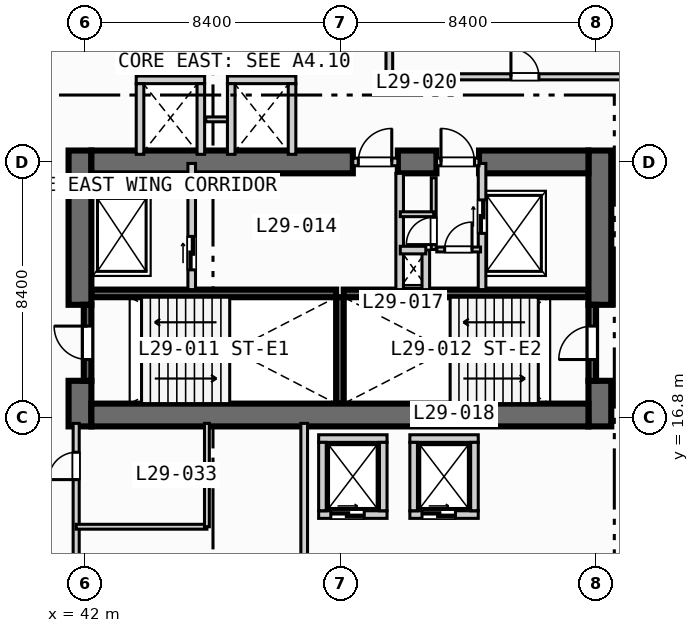
"""IFC4 building model, lengths in metres.
Left out: names, types, materials, properties, quantities, classifications, styles, units other than length and angle.
Written with IfcOpenShell. Run it as: python <this file> out.ifc"""

import sys

from ifc_helpers import new_model, si_unit, direction, frame, frame_2d, origin, place, context, subcontext, project, spatial, rectangle, extrude, element, fill, save


model = new_model("IFC4")
c1 = context("Model", 3, precision=1e-05, world=origin(), true_north=direction((0.0, 1.0)))
c2 = subcontext(c1, "Body", "Model", "MODEL_VIEW")
j1 = project(units=[si_unit("LENGTHUNIT", "METRE"), si_unit("PLANEANGLEUNIT", "RADIAN")], contexts=[c1])
p1 = place(None, origin())
s1 = spatial("IfcSite", under=j1, at=p1, CompositionType="ELEMENT")
p2 = place(p1, origin())
s2 = spatial("IfcBuilding", under=s1, at=p2, CompositionType="ELEMENT")
p3 = place(p2, frame((0.0, 0.0, 122.8)))
s3 = spatial("IfcBuildingStorey", under=s2, at=p3, CompositionType="ELEMENT", Elevation=122.8)
for number, where, z_axis, x_axis in (
    (1, (42.2, 20.875, 0.0), (0.0, 0.0, 1.0), (1.0, 0.0, 0.0)),
    (2, (50.5, 20.875, 0.0), (0.0, 0.0, 1.0), (1.0, 0.0, 0.0)),
):
    element("IfcWall", number, at=place(p3, frame(where, z_axis=z_axis, x_axis=x_axis)), inside=s3, PredefinedType="SOLIDWALL", context=c2, shape_type="SweptSolid", body=[
        extrude(rectangle(XDim=8.05, YDim=0.25, at=frame_2d((4.025, 0.0))), origin(), (0.0, 0.0, 1.0), 3.55),
    ])
p4 = place(p3, frame((50.375, 17.25, 0.0), z_axis=(0.0, 0.0, 1.0), x_axis=(0.0, 1.0, 0.0)))
e3 = element("IfcWall", 3, at=p4, inside=s3, PredefinedType="SOLIDWALL", context=c2, shape_type="SweptSolid", body=[
    extrude(rectangle(XDim=3.5, YDim=0.25, at=frame_2d((1.75, 0.0))), origin(), (0.0, 0.0, 1.0), 3.55),
])
p5 = place(p3, frame((41.825, 16.5, 0.0), z_axis=(0.0, 0.0, 1.0), x_axis=(0.0, 1.0, 0.0)))
e4 = element("IfcWall", 4, at=p5, inside=s3, PredefinedType="SHEAR", context=c2, shape_type="SweptSolid", body=[
    extrude(rectangle(XDim=1.5, YDim=0.75, at=frame_2d((0.75, 0.0))), origin(), (0.0, 0.0, 1.0), 3.55),
])
p6 = place(p3, frame((41.825, 20.5, 0.0), z_axis=(0.0, 0.0, 1.0), x_axis=(0.0, 1.0, 0.0)))
e5 = element("IfcWall", 5, at=p6, inside=s3, PredefinedType="SHEAR", context=c2, shape_type="SweptSolid", body=[
    extrude(rectangle(XDim=5.075, YDim=0.75, at=frame_2d((2.538, 0.0))), origin(), (0.0, 0.0, 1.0), 3.55),
])
p7 = place(p3, frame((58.925, 16.5, 0.0), z_axis=(0.0, 0.0, 1.0), x_axis=(0.0, 1.0, 0.0)))
e6 = element("IfcWall", 6, at=p7, inside=s3, PredefinedType="SHEAR", context=c2, shape_type="SweptSolid", body=[
    extrude(rectangle(XDim=1.5, YDim=0.75, at=frame_2d((0.75, 0.0))), origin(), (0.0, 0.0, 1.0), 3.55),
])
p8 = place(p3, frame((58.925, 20.5, 0.0), z_axis=(0.0, 0.0, 1.0), x_axis=(0.0, 1.0, 0.0)))
e7 = element("IfcWall", 7, at=p8, inside=s3, PredefinedType="SHEAR", context=c2, shape_type="SweptSolid", body=[
    extrude(rectangle(XDim=5.075, YDim=0.75, at=frame_2d((2.538, 0.0))), origin(), (0.0, 0.0, 1.0), 3.55),
])
p9 = place(p3, frame((42.2, 16.875, 0.0), z_axis=(0.0, 0.0, 1.0), x_axis=(1.0, 0.0, 0.0)))
e8 = element("IfcWall", 8, at=p9, inside=s3, PredefinedType="SHEAR", context=c2, shape_type="SweptSolid", body=[
    extrude(rectangle(XDim=16.35, YDim=0.75, at=frame_2d((8.175, 0.0))), origin(), (0.0, 0.0, 1.0), 3.55),
])
p10 = place(p3, frame((42.2, 25.2, 0.0), z_axis=(0.0, 0.0, 1.0), x_axis=(1.0, 0.0, 0.0)))
e9 = element("IfcWall", 9, at=p10, inside=s3, PredefinedType="SHEAR", context=c2, shape_type="SweptSolid", body=[
    extrude(rectangle(XDim=8.6, YDim=0.75, at=frame_2d((4.3, 0.0))), origin(), (0.0, 0.0, 1.0), 3.55),
])
p11 = place(p3, frame((52.28, 25.2, 0.0), z_axis=(0.0, 0.0, 1.0), x_axis=(1.0, 0.0, 0.0)))
e10 = element("IfcWall", 10, at=p11, inside=s3, PredefinedType="SHEAR", context=c2, shape_type="SweptSolid", body=[
    extrude(rectangle(XDim=1.27, YDim=0.75, at=frame_2d((0.635, 0.0))), origin(), (0.0, 0.0, 1.0), 3.55),
])
p12 = place(p3, frame((54.95, 25.2, 0.0), z_axis=(0.0, 0.0, 1.0), x_axis=(1.0, 0.0, 0.0)))
e11 = element("IfcWall", 11, at=p12, inside=s3, PredefinedType="SHEAR", context=c2, shape_type="SweptSolid", body=[
    extrude(rectangle(XDim=3.6, YDim=0.75, at=frame_2d((1.8, 0.0))), origin(), (0.0, 0.0, 1.0), 3.55),
])
p13 = place(p3, frame((42.075, 18.0, 0.0), z_axis=(0.0, 0.0, 1.0), x_axis=(0.0, 1.0, 0.0)))
e12 = element("IfcWall", 12, at=p13, inside=s3, PredefinedType="SOLIDWALL", context=c2, shape_type="SweptSolid", body=[
    extrude(rectangle(XDim=2.5, YDim=0.25, at=frame_2d((1.25, 0.0))), origin(), (0.0, 0.0, 1.0), 3.55),
])
p14 = place(p13, frame((0.7, 0.0, 0.0)))
e13 = element("IfcOpeningElement", 13, at=p14, cuts=e12, PredefinedType="OPENING", context=c2, shape_type="SweptSolid", body=[
    extrude(rectangle(XDim=1.1, YDim=2.15, at=frame_2d((0.55, 1.075))), frame((0.0, 0.135, 0.0), z_axis=(0.0, -1.0, 0.0), x_axis=(1.0, 0.0, 0.0)), (0.0, 0.0, 1.0), 0.27),
])
p15 = place(p3, frame((58.675, 18.0, 0.0), z_axis=(0.0, 0.0, 1.0), x_axis=(0.0, 1.0, 0.0)))
e14 = element("IfcWall", 14, at=p15, inside=s3, PredefinedType="SOLIDWALL", context=c2, shape_type="SweptSolid", body=[
    extrude(rectangle(XDim=2.5, YDim=0.25, at=frame_2d((1.25, 0.0))), origin(), (0.0, 0.0, 1.0), 3.55),
])
p16 = place(p15, frame((0.7, 0.0, 0.0)))
e15 = element("IfcOpeningElement", 15, at=p16, cuts=e14, PredefinedType="OPENING", context=c2, shape_type="SweptSolid", body=[
    extrude(rectangle(XDim=1.1, YDim=2.15, at=frame_2d((0.55, 1.075))), frame((0.0, 0.135, 0.0), z_axis=(0.0, -1.0, 0.0), x_axis=(1.0, 0.0, 0.0)), (0.0, 0.0, 1.0), 0.27),
])
p17 = place(p3, frame((45.5, 21.0, 0.0), z_axis=(0.0, 0.0, 1.0), x_axis=(0.0, 1.0, 0.0)))
e16 = element("IfcWall", 16, at=p17, inside=s3, PredefinedType="SOLIDWALL", context=c2, shape_type="SweptSolid", body=[
    extrude(rectangle(XDim=4.15, YDim=0.25, at=frame_2d((2.075, 0.0))), origin(), (0.0, 0.0, 1.0), 3.55),
])
p18 = place(p17, frame((0.65, 0.0, 0.0)))
e17 = element("IfcOpeningElement", 17, at=p18, cuts=e16, PredefinedType="OPENING", context=c2, shape_type="SweptSolid", body=[
    extrude(rectangle(XDim=1.1, YDim=2.15, at=frame_2d((0.55, 1.075))), frame((0.0, 0.135, 0.0), z_axis=(0.0, -1.0, 0.0), x_axis=(1.0, 0.0, 0.0)), (0.0, 0.0, 1.0), 0.27),
])
p19 = place(p3, frame((50.8, 25.2, 0.0), z_axis=(0.0, 0.0, 1.0), x_axis=(1.0, 0.0, 0.0)))
e18 = element("IfcWall", 18, at=p19, inside=s3, PredefinedType="SOLIDWALL", context=c2, shape_type="SweptSolid", body=[
    extrude(rectangle(XDim=1.48, YDim=0.25, at=frame_2d((0.74, 0.0))), origin(), (0.0, 0.0, 1.0), 3.55),
])
p20 = place(p19, frame((0.18, 0.0, 0.0)))
e19 = element("IfcOpeningElement", 19, at=p20, cuts=e18, PredefinedType="OPENING", context=c2, shape_type="SweptSolid", body=[
    extrude(rectangle(XDim=1.1, YDim=2.15, at=frame_2d((0.55, 1.075))), frame((0.0, 0.135, 0.0), z_axis=(0.0, -1.0, 0.0), x_axis=(1.0, 0.0, 0.0)), (0.0, 0.0, 1.0), 0.27),
])
p21 = place(p3, frame((52.34, 21.0, 0.0), z_axis=(0.0, 0.0, 1.0), x_axis=(0.0, 1.0, 0.0)))
e20 = element("IfcWall", 20, at=p21, inside=s3, PredefinedType="SOLIDWALL", context=c2, shape_type="SweptSolid", body=[
    extrude(rectangle(XDim=3.825, YDim=0.25, at=frame_2d((1.913, 0.0))), origin(), (0.0, 0.0, 1.0), 3.55),
])
p22 = place(p3, frame((55.05, 21.0, 0.0), z_axis=(0.0, 0.0, 1.0), x_axis=(0.0, 1.0, 0.0)))
e21 = element("IfcWall", 21, at=p22, inside=s3, PredefinedType="SOLIDWALL", context=c2, shape_type="SweptSolid", body=[
    extrude(rectangle(XDim=4.15, YDim=0.25, at=frame_2d((2.075, 0.0))), origin(), (0.0, 0.0, 1.0), 3.55),
])
p23 = place(p22, frame((1.85, 0.0, 0.0)))
e22 = element("IfcOpeningElement", 22, at=p23, cuts=e21, PredefinedType="OPENING", context=c2, shape_type="SweptSolid", body=[
    extrude(rectangle(XDim=1.1, YDim=2.15, at=frame_2d((0.55, 1.075))), frame((0.0, 0.135, 0.0), z_axis=(0.0, -1.0, 0.0), x_axis=(1.0, 0.0, 0.0)), (0.0, 0.0, 1.0), 0.27),
])
p24 = place(p3, frame((53.55, 25.2, 0.0), z_axis=(0.0, 0.0, 1.0), x_axis=(1.0, 0.0, 0.0)))
e23 = element("IfcWall", 23, at=p24, inside=s3, PredefinedType="SOLIDWALL", context=c2, shape_type="SweptSolid", body=[
    extrude(rectangle(XDim=1.4, YDim=0.25, at=frame_2d((0.7, 0.0))), origin(), (0.0, 0.0, 1.0), 3.55),
])
p25 = place(p24, frame((0.15, 0.0, 0.0)))
e24 = element("IfcOpeningElement", 24, at=p25, cuts=e23, PredefinedType="OPENING", context=c2, shape_type="SweptSolid", body=[
    extrude(rectangle(XDim=1.1, YDim=2.15, at=frame_2d((0.55, 1.075))), frame((0.0, 0.135, 0.0), z_axis=(0.0, -1.0, 0.0), x_axis=(1.0, 0.0, 0.0)), (0.0, 0.0, 1.0), 0.27),
])
p26 = place(p3, frame((53.2, 21.0, 0.0), z_axis=(0.0, 0.0, 1.0), x_axis=(0.0, 1.0, 0.0)))
e25 = element("IfcWall", 25, at=p26, inside=s3, PredefinedType="SOLIDWALL", context=c2, shape_type="SweptSolid", body=[
    extrude(rectangle(XDim=1.3, YDim=0.25, at=frame_2d((0.65, 0.0))), origin(), (0.0, 0.0, 1.0), 3.55),
])
p27 = place(p3, frame((52.36, 22.3, 0.0), z_axis=(0.0, 0.0, 1.0), x_axis=(1.0, 0.0, 0.0)))
e26 = element("IfcWall", 26, at=p27, inside=s3, PredefinedType="SOLIDWALL", context=c2, shape_type="SweptSolid", body=[
    extrude(rectangle(XDim=0.84, YDim=0.25, at=frame_2d((0.42, 0.0))), origin(), (0.0, 0.0, 1.0), 3.55),
])
p28 = place(p3, frame((53.56, 22.32, 0.0), z_axis=(0.0, 0.0, 1.0), x_axis=(1.0, 0.0, 0.0)))
e27 = element("IfcWall", 27, at=p28, inside=s3, PredefinedType="PARTITIONING", context=c2, shape_type="SweptSolid", body=[
    extrude(rectangle(XDim=1.44, YDim=0.16, at=frame_2d((0.72, 0.0))), origin(), (0.0, 0.0, 1.0), 3.55),
])
p29 = place(p28, frame((0.26, 0.0, 0.0)))
e28 = element("IfcOpeningElement", 28, at=p29, cuts=e27, PredefinedType="OPENING", context=c2, shape_type="SweptSolid", body=[
    extrude(rectangle(XDim=0.9, YDim=2.1, at=frame_2d((0.45, 1.05))), frame((0.0, 0.09, 0.0), z_axis=(0.0, -1.0, 0.0), x_axis=(1.0, 0.0, 0.0)), (0.0, 0.0, 1.0), 0.18),
])
p30 = place(p3, frame((53.46, 22.32, 0.0), z_axis=(0.0, 0.0, 1.0), x_axis=(0.0, 1.0, 0.0)))
e29 = element("IfcWall", 29, at=p30, inside=s3, PredefinedType="PARTITIONING", context=c2, shape_type="SweptSolid", body=[
    extrude(rectangle(XDim=2.36, YDim=0.16, at=frame_2d((1.18, 0.0))), origin(), (0.0, 0.0, 1.0), 3.55),
])
p31 = place(p30, frame((0.16, 0.0, 0.0)))
e30 = element("IfcOpeningElement", 30, at=p31, cuts=e29, PredefinedType="OPENING", context=c2, shape_type="SweptSolid", body=[
    extrude(rectangle(XDim=0.9, YDim=2.1, at=frame_2d((0.45, 1.05))), frame((0.0, 0.09, 0.0), z_axis=(0.0, -1.0, 0.0), x_axis=(1.0, 0.0, 0.0)), (0.0, 0.0, 1.0), 0.18),
])
p32 = place(p3, frame((52.36, 23.48, 0.0), z_axis=(0.0, 0.0, 1.0), x_axis=(1.0, 0.0, 0.0)))
e31 = element("IfcWall", 31, at=p32, inside=s3, PredefinedType="PARTITIONING", context=c2, shape_type="SweptSolid", body=[
    extrude(rectangle(XDim=1.1, YDim=0.16, at=frame_2d((0.55, 0.0))), origin(), (0.0, 0.0, 1.0), 3.55),
])
p33 = place(p3, frame((49.675, 13.6, 0.0), z_axis=(0.0, 0.0, 1.0), x_axis=(1.0, 0.0, 0.0)))
e32 = element("IfcWall", 32, at=p33, inside=s3, PredefinedType="SOLIDWALL", context=c2, shape_type="SweptSolid", body=[
    extrude(rectangle(XDim=2.25, YDim=0.25, at=frame_2d((1.125, 0.0))), origin(), (0.0, 0.0, 1.0), 3.55),
])
p34 = place(p33, frame((0.4, 0.0, 0.0)))
e33 = element("IfcOpeningElement", 33, at=p34, cuts=e32, PredefinedType="OPENING", context=c2, shape_type="SweptSolid", body=[
    extrude(rectangle(XDim=1.1, YDim=2.15, at=frame_2d((0.55, 1.075))), frame((0.0, 0.135, 0.0), z_axis=(0.0, -1.0, 0.0), x_axis=(1.0, 0.0, 0.0)), (0.0, 0.0, 1.0), 0.27),
])
for number, where, z_axis, x_axis in (
    (34, (49.675, 16.1, 0.0), (0.0, 0.0, 1.0), (1.0, 0.0, 0.0)),
    (35, (49.8, 13.725, 0.0), (0.0, 0.0, 1.0), (0.0, 1.0, 0.0)),
    (36, (51.8, 13.725, 0.0), (0.0, 0.0, 1.0), (0.0, 1.0, 0.0)),
):
    element("IfcWall", number, at=place(p3, frame(where, z_axis=z_axis, x_axis=x_axis)), inside=s3, PredefinedType="SOLIDWALL", context=c2, shape_type="SweptSolid", body=[
        extrude(rectangle(XDim=2.25, YDim=0.25, at=frame_2d((1.125, 0.0))), origin(), (0.0, 0.0, 1.0), 3.55),
    ])
p35 = place(p3, frame((52.675, 13.6, 0.0), z_axis=(0.0, 0.0, 1.0), x_axis=(1.0, 0.0, 0.0)))
e37 = element("IfcWall", 37, at=p35, inside=s3, PredefinedType="SOLIDWALL", context=c2, shape_type="SweptSolid", body=[
    extrude(rectangle(XDim=2.25, YDim=0.25, at=frame_2d((1.125, 0.0))), origin(), (0.0, 0.0, 1.0), 3.55),
])
p36 = place(p35, frame((0.4, 0.0, 0.0)))
e38 = element("IfcOpeningElement", 38, at=p36, cuts=e37, PredefinedType="OPENING", context=c2, shape_type="SweptSolid", body=[
    extrude(rectangle(XDim=1.1, YDim=2.15, at=frame_2d((0.55, 1.075))), frame((0.0, 0.135, 0.0), z_axis=(0.0, -1.0, 0.0), x_axis=(1.0, 0.0, 0.0)), (0.0, 0.0, 1.0), 0.27),
])
for number, where, z_axis, x_axis in (
    (39, (52.675, 16.1, 0.0), (0.0, 0.0, 1.0), (1.0, 0.0, 0.0)),
    (40, (52.8, 13.725, 0.0), (0.0, 0.0, 1.0), (0.0, 1.0, 0.0)),
    (41, (54.8, 13.725, 0.0), (0.0, 0.0, 1.0), (0.0, 1.0, 0.0)),
    (42, (43.675, 27.9, 0.0), (0.0, 0.0, 1.0), (1.0, 0.0, 0.0)),
):
    element("IfcWall", number, at=place(p3, frame(where, z_axis=z_axis, x_axis=x_axis)), inside=s3, PredefinedType="SOLIDWALL", context=c2, shape_type="SweptSolid", body=[
        extrude(rectangle(XDim=2.25, YDim=0.25, at=frame_2d((1.125, 0.0))), origin(), (0.0, 0.0, 1.0), 3.55),
    ])
for number, where, z_axis, x_axis in (
    (43, (43.8, 25.45, 0.0), (0.0, 0.0, 1.0), (0.0, 1.0, 0.0)),
    (44, (45.8, 25.45, 0.0), (0.0, 0.0, 1.0), (0.0, 1.0, 0.0)),
):
    element("IfcWall", number, at=place(p3, frame(where, z_axis=z_axis, x_axis=x_axis)), inside=s3, PredefinedType="SOLIDWALL", context=c2, shape_type="SweptSolid", body=[
        extrude(rectangle(XDim=2.325, YDim=0.25, at=frame_2d((1.163, 0.0))), origin(), (0.0, 0.0, 1.0), 3.55),
    ])
p37 = place(p3, frame((45.96, 26.6, 0.0), z_axis=(0.0, 0.0, 1.0), x_axis=(1.0, 0.0, 0.0)))
e45 = element("IfcWall", 45, at=p37, inside=s3, PredefinedType="PARTITIONING", context=c2, shape_type="SweptSolid", body=[
    extrude(rectangle(XDim=0.88, YDim=0.16, at=frame_2d((0.44, 0.0))), origin(), (0.0, 0.0, 1.0), 3.55),
])
p38 = place(p3, frame((46.675, 27.9, 0.0), z_axis=(0.0, 0.0, 1.0), x_axis=(1.0, 0.0, 0.0)))
e46 = element("IfcWall", 46, at=p38, inside=s3, PredefinedType="SOLIDWALL", context=c2, shape_type="SweptSolid", body=[
    extrude(rectangle(XDim=2.25, YDim=0.25, at=frame_2d((1.125, 0.0))), origin(), (0.0, 0.0, 1.0), 3.55),
])
for number, where, z_axis, x_axis in (
    (47, (46.8, 25.45, 0.0), (0.0, 0.0, 1.0), (0.0, 1.0, 0.0)),
    (48, (48.8, 25.45, 0.0), (0.0, 0.0, 1.0), (0.0, 1.0, 0.0)),
):
    element("IfcWall", number, at=place(p3, frame(where, z_axis=z_axis, x_axis=x_axis)), inside=s3, PredefinedType="SOLIDWALL", context=c2, shape_type="SweptSolid", body=[
        extrude(rectangle(XDim=2.325, YDim=0.25, at=frame_2d((1.163, 0.0))), origin(), (0.0, 0.0, 1.0), 3.55),
    ])
p39 = place(p3, frame((41.7, 0.35, 0.0), z_axis=(0.0, 0.0, 1.0), x_axis=(0.0, 1.0, 0.0)))
e49 = element("IfcWall", 49, at=p39, inside=s3, PredefinedType="PARTITIONING", context=c2, shape_type="SweptSolid", body=[
    extrude(rectangle(XDim=16.25, YDim=0.2, at=frame_2d((8.125, 0.0))), origin(), (0.0, 0.0, 1.0), 2.8),
])
p40 = place(p39, frame((5.0, 0.0, 0.0)))
e50 = element("IfcOpeningElement", 50, at=p40, cuts=e49, PredefinedType="OPENING", context=c2, shape_type="SweptSolid", body=[
    extrude(rectangle(XDim=0.92, YDim=2.1, at=frame_2d((0.46, 1.05))), frame((0.0, 0.11, 0.0), z_axis=(0.0, -1.0, 0.0), x_axis=(1.0, 0.0, 0.0)), (0.0, 0.0, 1.0), 0.22),
])
p41 = place(p39, frame((14.4, 0.0, 0.0)))
e51 = element("IfcOpeningElement", 51, at=p41, cuts=e49, PredefinedType="OPENING", context=c2, shape_type="SweptSolid", body=[
    extrude(rectangle(XDim=0.9, YDim=2.1, at=frame_2d((0.45, 1.05))), frame((0.0, 0.11, 0.0), z_axis=(0.0, -1.0, 0.0), x_axis=(1.0, 0.0, 0.0)), (0.0, 0.0, 1.0), 0.22),
])
p42 = place(p3, frame((49.2, 0.35, 0.0), z_axis=(0.0, 0.0, 1.0), x_axis=(0.0, 1.0, 0.0)))
e52 = element("IfcWall", 52, at=p42, inside=s3, PredefinedType="PARTITIONING", context=c2, shape_type="SweptSolid", body=[
    extrude(rectangle(XDim=16.25, YDim=0.22, at=frame_2d((8.125, 0.0))), origin(), (0.0, 0.0, 1.0), 3.55),
])
p43 = place(p3, frame((41.7, 13.2, 0.0), z_axis=(0.0, 0.0, 1.0), x_axis=(1.0, 0.0, 0.0)))
e53 = element("IfcWall", 53, at=p43, inside=s3, PredefinedType="PARTITIONING", context=c2, shape_type="SweptSolid", body=[
    extrude(rectangle(XDim=4.3, YDim=0.16, at=frame_2d((2.15, 0.0))), origin(), (0.0, 0.0, 1.0), 3.55),
])
p44 = place(p3, frame((46.0, 13.2, 0.0), z_axis=(0.0, 0.0, 1.0), x_axis=(0.0, 1.0, 0.0)))
e54 = element("IfcWall", 54, at=p44, inside=s3, PredefinedType="PARTITIONING", context=c2, shape_type="SweptSolid", body=[
    extrude(rectangle(XDim=3.4, YDim=0.16, at=frame_2d((1.7, 0.0))), origin(), (0.0, 0.0, 1.0), 3.55),
])
p45 = place(p3, frame((52.0, 28.0, 0.0), z_axis=(0.0, 0.0, 1.0), x_axis=(1.0, 0.0, 0.0)))
e55 = element("IfcWall", 55, at=p45, inside=s3, PredefinedType="PARTITIONING", context=c2, shape_type="SweptSolid", body=[
    extrude(rectangle(XDim=23.25, YDim=0.2, at=frame_2d((11.625, 0.0))), origin(), (0.0, 0.0, 1.0), 3.55),
])
p46 = place(p45, frame((4.0, 0.0, 0.0)))
e56 = element("IfcOpeningElement", 56, at=p46, cuts=e55, PredefinedType="OPENING", context=c2, shape_type="SweptSolid", body=[
    extrude(rectangle(XDim=0.92, YDim=2.1, at=frame_2d((0.46, 1.05))), frame((0.0, 0.11, 0.0), z_axis=(0.0, -1.0, 0.0), x_axis=(1.0, 0.0, 0.0)), (0.0, 0.0, 1.0), 0.22),
])
p47 = place(p3, frame((52.0, 28.0, 0.0), z_axis=(0.0, 0.0, 1.0), x_axis=(0.0, 1.0, 0.0)))
e57 = element("IfcWall", 57, at=p47, inside=s3, PredefinedType="PARTITIONING", context=c2, shape_type="SweptSolid", body=[
    extrude(rectangle(XDim=5.3, YDim=0.22, at=frame_2d((2.65, 0.0))), origin(), (0.0, 0.0, 1.0), 3.55),
])
p48 = place(p14, origin())
e58 = element("IfcDoor", 58, at=p48, inside=s3, OperationType="SINGLE_SWING_RIGHT", PredefinedType="DOOR", context=c2, shape_type="SweptSolid", body=[
    extrude(rectangle(XDim=1.1, YDim=2.15, at=frame_2d((0.55, 1.075))), frame((0.0, 0.025, 0.0), z_axis=(0.0, -1.0, 0.0), x_axis=(1.0, 0.0, 0.0)), (0.0, 0.0, 1.0), 0.05),
])
fill(e13, e58)
p49 = place(p16, origin())
e59 = element("IfcDoor", 59, at=p49, inside=s3, OperationType="SINGLE_SWING_LEFT", PredefinedType="DOOR", context=c2, shape_type="SweptSolid", body=[
    extrude(rectangle(XDim=1.1, YDim=2.15, at=frame_2d((0.55, 1.075))), frame((0.0, 0.025, 0.0), z_axis=(0.0, -1.0, 0.0), x_axis=(1.0, 0.0, 0.0)), (0.0, 0.0, 1.0), 0.05),
])
fill(e15, e59)
p50 = place(p18, origin())
e60 = element("IfcDoor", 60, at=p50, inside=s3, OperationType="SLIDING_TO_LEFT", PredefinedType="DOOR", context=c2, shape_type="SweptSolid", body=[
    extrude(rectangle(XDim=1.1, YDim=2.15, at=frame_2d((0.55, 1.075))), frame((0.0, 0.025, 0.0), z_axis=(0.0, -1.0, 0.0), x_axis=(1.0, 0.0, 0.0)), (0.0, 0.0, 1.0), 0.05),
])
fill(e17, e60)
p51 = place(p20, origin())
e61 = element("IfcDoor", 61, at=p51, inside=s3, OperationType="SINGLE_SWING_RIGHT", PredefinedType="DOOR", context=c2, shape_type="SweptSolid", body=[
    extrude(rectangle(XDim=1.1, YDim=2.15, at=frame_2d((0.55, 1.075))), frame((0.0, 0.025, 0.0), z_axis=(0.0, -1.0, 0.0), x_axis=(1.0, 0.0, 0.0)), (0.0, 0.0, 1.0), 0.05),
])
fill(e19, e61)
p52 = place(p23, origin())
e62 = element("IfcDoor", 62, at=p52, inside=s3, OperationType="SLIDING_TO_LEFT", PredefinedType="DOOR", context=c2, shape_type="SweptSolid", body=[
    extrude(rectangle(XDim=1.1, YDim=2.15, at=frame_2d((0.55, 1.075))), frame((0.0, 0.025, 0.0), z_axis=(0.0, -1.0, 0.0), x_axis=(1.0, 0.0, 0.0)), (0.0, 0.0, 1.0), 0.05),
])
fill(e22, e62)
p53 = place(p25, origin())
e63 = element("IfcDoor", 63, at=p53, inside=s3, OperationType="SINGLE_SWING_LEFT", PredefinedType="DOOR", context=c2, shape_type="SweptSolid", body=[
    extrude(rectangle(XDim=1.1, YDim=2.15, at=frame_2d((0.55, 1.075))), frame((0.0, 0.025, 0.0), z_axis=(0.0, -1.0, 0.0), x_axis=(1.0, 0.0, 0.0)), (0.0, 0.0, 1.0), 0.05),
])
fill(e24, e63)
p54 = place(p29, origin())
e64 = element("IfcDoor", 64, at=p54, inside=s3, OperationType="SINGLE_SWING_RIGHT", PredefinedType="DOOR", context=c2, shape_type="SweptSolid", body=[
    extrude(rectangle(XDim=0.9, YDim=2.1, at=frame_2d((0.45, 1.05))), frame((0.0, 0.025, 0.0), z_axis=(0.0, -1.0, 0.0), x_axis=(1.0, 0.0, 0.0)), (0.0, 0.0, 1.0), 0.05),
])
fill(e28, e64)
p55 = place(p31, origin())
e65 = element("IfcDoor", 65, at=p55, inside=s3, OperationType="SINGLE_SWING_LEFT", PredefinedType="DOOR", context=c2, shape_type="SweptSolid", body=[
    extrude(rectangle(XDim=0.9, YDim=2.1, at=frame_2d((0.45, 1.05))), frame((0.0, 0.025, 0.0), z_axis=(0.0, -1.0, 0.0), x_axis=(1.0, 0.0, 0.0)), (0.0, 0.0, 1.0), 0.05),
])
fill(e30, e65)
p56 = place(p34, origin())
e66 = element("IfcDoor", 66, at=p56, inside=s3, OperationType="SLIDING_TO_LEFT", PredefinedType="DOOR", context=c2, shape_type="SweptSolid", body=[
    extrude(rectangle(XDim=1.1, YDim=2.15, at=frame_2d((0.55, 1.075))), frame((0.0, 0.025, 0.0), z_axis=(0.0, -1.0, 0.0), x_axis=(1.0, 0.0, 0.0)), (0.0, 0.0, 1.0), 0.05),
])
fill(e33, e66)
p57 = place(p36, origin())
e67 = element("IfcDoor", 67, at=p57, inside=s3, OperationType="SLIDING_TO_LEFT", PredefinedType="DOOR", context=c2, shape_type="SweptSolid", body=[
    extrude(rectangle(XDim=1.1, YDim=2.15, at=frame_2d((0.55, 1.075))), frame((0.0, 0.025, 0.0), z_axis=(0.0, -1.0, 0.0), x_axis=(1.0, 0.0, 0.0)), (0.0, 0.0, 1.0), 0.05),
])
fill(e38, e67)
p58 = place(p41, origin())
e68 = element("IfcDoor", 68, at=p58, inside=s3, OperationType="SINGLE_SWING_LEFT", PredefinedType="DOOR", context=c2, shape_type="SweptSolid", body=[
    extrude(rectangle(XDim=0.9, YDim=2.1, at=frame_2d((0.45, 1.05))), frame((0.0, 0.025, 0.0), z_axis=(0.0, -1.0, 0.0), x_axis=(1.0, 0.0, 0.0)), (0.0, 0.0, 1.0), 0.05),
])
fill(e51, e68)
p59 = place(p46, origin())
e69 = element("IfcDoor", 69, at=p59, inside=s3, OperationType="SINGLE_SWING_LEFT", PredefinedType="DOOR", context=c2, shape_type="SweptSolid", body=[
    extrude(rectangle(XDim=0.92, YDim=2.1, at=frame_2d((0.46, 1.05))), frame((0.0, 0.025, 0.0), z_axis=(0.0, -1.0, 0.0), x_axis=(1.0, 0.0, 0.0)), (0.0, 0.0, 1.0), 0.05),
])
fill(e56, e69)
save(model, sys.argv[1])
